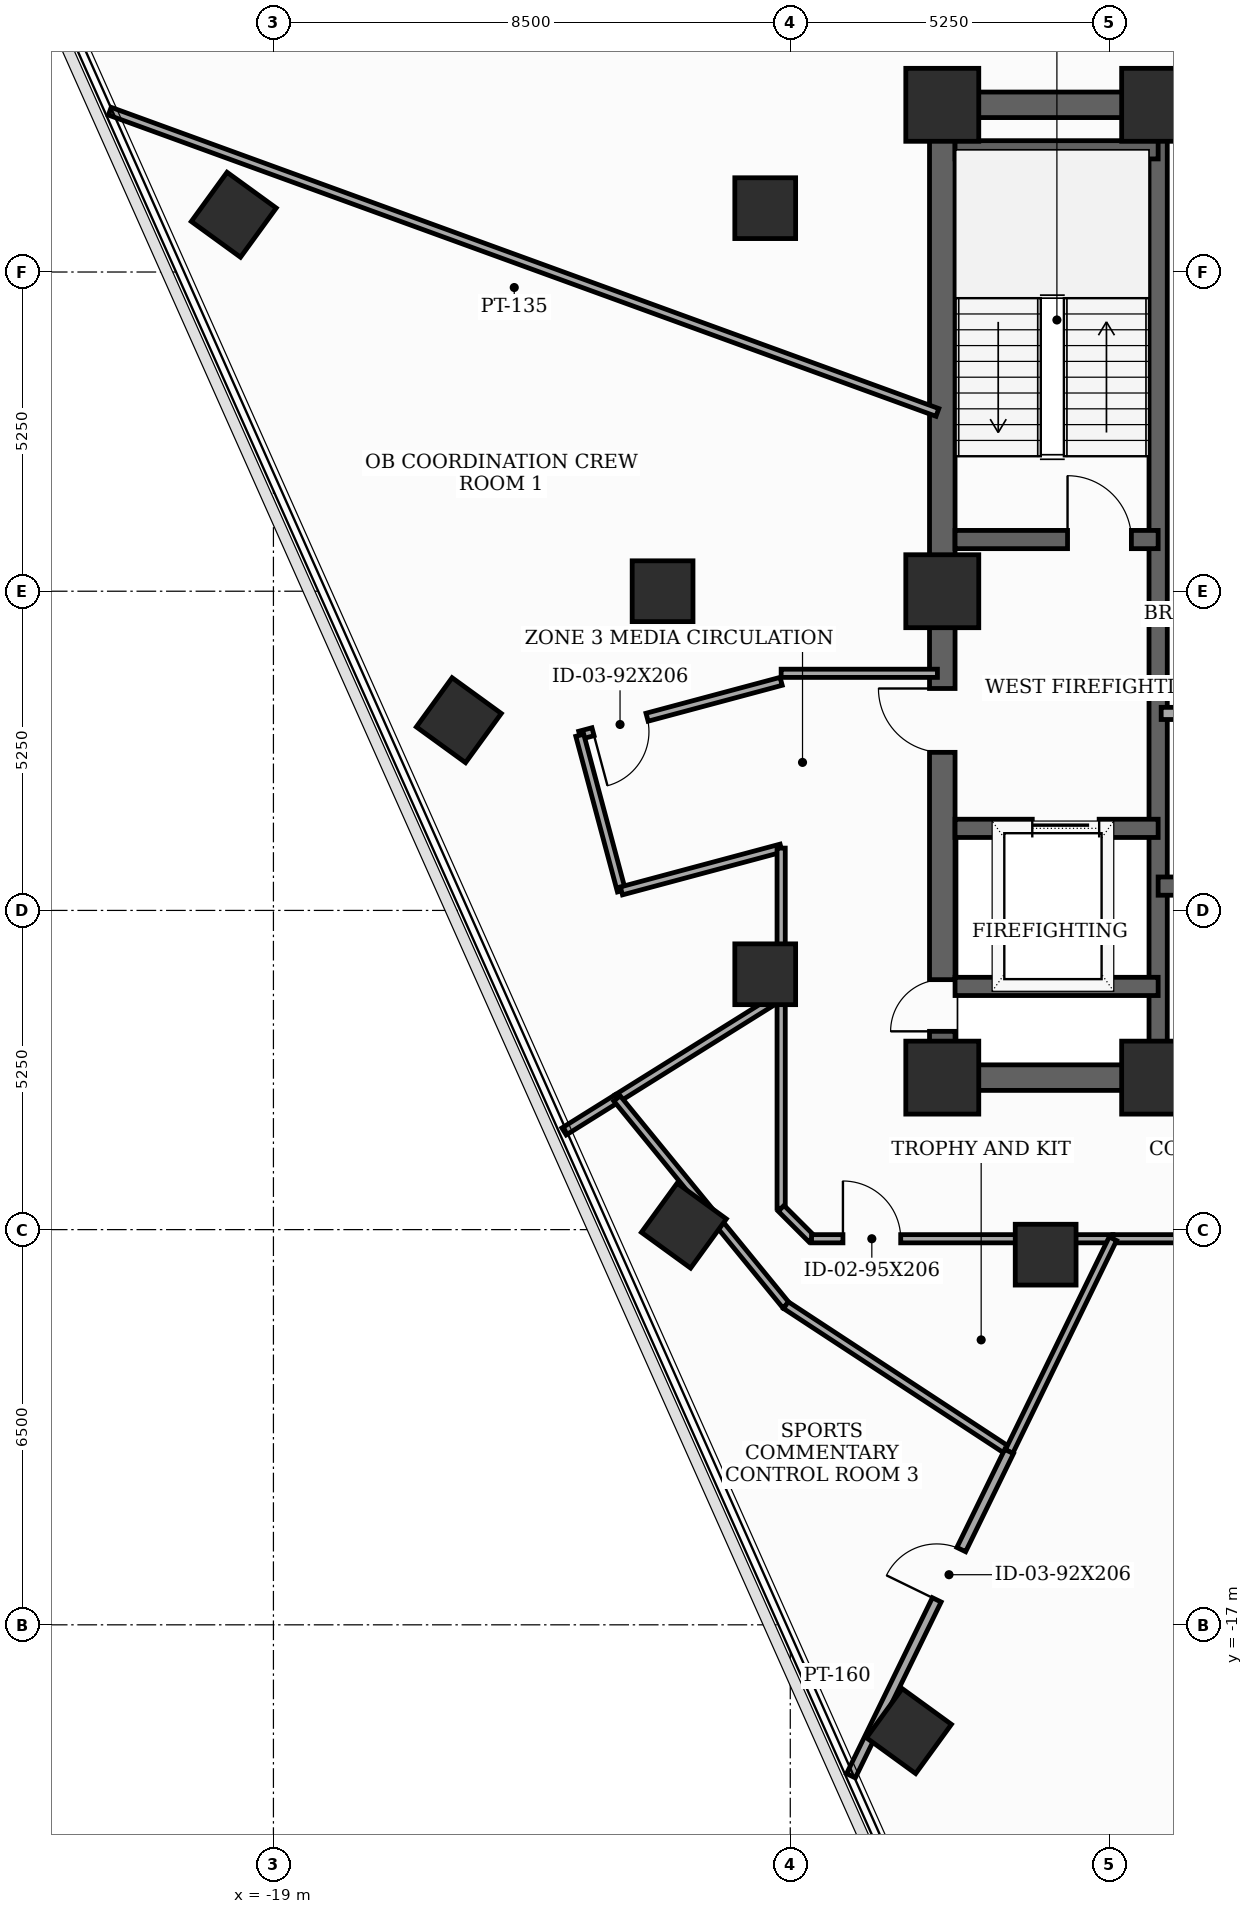
"""IFC4 building model, lengths in metres.
Left out: names, types, materials, properties, quantities, classifications, styles, units other than length and angle.
Written with IfcOpenShell. Run it as: python <this file> out.ifc"""

import sys

from ifc_helpers import new_model, si_unit, direction, frame, frame_2d, origin, origin_2d, place, context, subcontext, project, spatial, rectangle, extrude, element, fill, save


model = new_model("IFC4")
c1 = context("Model", 3, precision=1e-05, world=origin(), true_north=direction((0.0, 1.0)))
c2 = subcontext(c1, "Body", "Model", "MODEL_VIEW")
j1 = project(units=[si_unit("LENGTHUNIT", "METRE"), si_unit("PLANEANGLEUNIT", "RADIAN")], contexts=[c1])
p1 = place(None, origin())
s1 = spatial("IfcSite", under=j1, at=p1, CompositionType="ELEMENT")
p2 = place(p1, origin())
s2 = spatial("IfcBuilding", under=s1, at=p2, CompositionType="ELEMENT")
p3 = place(p2, frame((0.0, 0.0, 244.8)))
s3 = spatial("IfcBuildingStorey", under=s2, at=p3, CompositionType="ELEMENT", Elevation=244.8)
for number, where, z_axis, x_axis in (
    (1, (-8.0, -8.0, 0.0), (0.0, 0.0, 1.0), (1.0, 0.0, 0.0)),
    (2, (-4.45, -8.0, 0.0), (0.0, 0.0, 1.0), (1.0, 0.0, 0.0)),
    (3, (-4.45, 8.0, 0.0), (0.0, 0.0, 1.0), (1.0, 0.0, 0.0)),
    (4, (-8.0, 8.0, 0.0), (0.0, 0.0, 1.0), (1.0, 0.0, 0.0)),
    (5, (-8.0, 0.0, 0.0), (0.0, 0.0, 1.0), (1.0, 0.0, 0.0)),
):
    element("IfcColumn", number, at=place(p3, frame(where, z_axis=z_axis, x_axis=x_axis)), inside=s3, PredefinedType="COLUMN", context=c2, shape_type="SweptSolid", body=[
        extrude(rectangle(XDim=1.2, YDim=1.2, at=origin_2d()), origin(), (0.0, 0.0, 1.0), 3.7),
    ])
for number, where, z_axis, x_axis in (
    (6, (-10.912, 6.3, 0.0), (0.0, 0.0, 1.0), (1.0, 0.0, 0.0)),
    (7, (-12.6, 0.0, 0.0), (0.0, 0.0, 1.0), (1.0, 0.0, 0.0)),
    (8, (-10.912, -6.3, 0.0), (0.0, 0.0, 1.0), (1.0, 0.0, 0.0)),
    (9, (-6.3, -10.912, 0.0), (0.0, 0.0, 1.0), (1.0, 0.0, 0.0)),
    (10, (-19.652, 6.192, 0.0), (0.0, 0.0, 1.0), (0.588, 0.809, 0.0)),
    (11, (-15.951, -2.121, 0.0), (0.0, 0.0, 1.0), (0.588, 0.809, 0.0)),
    (12, (-12.25, -10.435, 0.0), (0.0, 0.0, 1.0), (0.588, 0.809, 0.0)),
    (13, (-8.548, -18.748, 0.0), (0.0, 0.0, 1.0), (0.588, 0.809, 0.0)),
):
    element("IfcColumn", number, at=place(p3, frame(where, z_axis=z_axis, x_axis=x_axis)), inside=s3, PredefinedType="COLUMN", context=c2, shape_type="SweptSolid", body=[
        extrude(rectangle(XDim=1.0, YDim=1.0, at=origin_2d()), origin(), (0.0, 0.0, 1.0), 3.7),
    ])
p4 = place(p3, frame((-8.0, -8.0, 0.0), z_axis=(0.0, 0.0, 1.0), x_axis=(0.0, 1.0, 0.0)))
e14 = element("IfcWall", 14, at=p4, inside=s3, PredefinedType="SHEAR", context=c2, shape_type="SweptSolid", body=[
    extrude(rectangle(XDim=16.0, YDim=0.42, at=frame_2d((8.0, 0.0))), origin(), (0.0, 0.0, 1.0), 3.5),
])
p5 = place(p4, frame((0.761, 0.0, 0.0)))
e15 = element("IfcOpeningElement", 15, at=p5, cuts=e14, PredefinedType="OPENING", context=c2, shape_type="SweptSolid", body=[
    extrude(rectangle(XDim=0.85, YDim=2.02, at=frame_2d((0.425, 1.01))), frame((0.0, 0.22, 0.0), z_axis=(0.0, -1.0, 0.0), x_axis=(1.0, 0.0, 0.0)), (0.0, 0.0, 1.0), 0.44),
])
p6 = place(p4, frame((5.35, 0.0, 0.0)))
e16 = element("IfcOpeningElement", 16, at=p6, cuts=e14, PredefinedType="OPENING", context=c2, shape_type="SweptSolid", body=[
    extrude(rectangle(XDim=1.05, YDim=2.15, at=frame_2d((0.525, 1.075))), frame((0.0, 0.22, 0.0), z_axis=(0.0, -1.0, 0.0), x_axis=(1.0, 0.0, 0.0)), (0.0, 0.0, 1.0), 0.44),
])
p7 = place(p3, frame((-8.0, -8.0, 0.0), z_axis=(0.0, 0.0, 1.0), x_axis=(1.0, 0.0, 0.0)))
e17 = element("IfcWall", 17, at=p7, inside=s3, PredefinedType="SHEAR", context=c2, shape_type="SweptSolid", body=[
    extrude(rectangle(XDim=16.0, YDim=0.42, at=frame_2d((8.0, 0.0))), origin(), (0.0, 0.0, 1.0), 3.5),
])
p8 = place(p7, frame((4.35, 0.0, 0.0)))
e18 = element("IfcOpeningElement", 18, at=p8, cuts=e17, PredefinedType="OPENING", context=c2, shape_type="SweptSolid", body=[
    extrude(rectangle(XDim=0.85, YDim=2.02, at=frame_2d((0.425, 1.01))), frame((0.0, 0.22, 0.0), z_axis=(0.0, -1.0, 0.0), x_axis=(1.0, 0.0, 0.0)), (0.0, 0.0, 1.0), 0.44),
])
p9 = place(p7, frame((6.49, 0.0, 0.0)))
e19 = element("IfcOpeningElement", 19, at=p9, cuts=e17, PredefinedType="OPENING", context=c2, shape_type="SweptSolid", body=[
    extrude(rectangle(XDim=0.85, YDim=2.02, at=frame_2d((0.425, 1.01))), frame((0.0, 0.22, 0.0), z_axis=(0.0, -1.0, 0.0), x_axis=(1.0, 0.0, 0.0)), (0.0, 0.0, 1.0), 0.44),
])
p10 = place(p7, frame((8.69, 0.0, 0.0)))
e20 = element("IfcOpeningElement", 20, at=p10, cuts=e17, PredefinedType="OPENING", context=c2, shape_type="SweptSolid", body=[
    extrude(rectangle(XDim=0.85, YDim=2.02, at=frame_2d((0.425, 1.01))), frame((0.0, 0.22, 0.0), z_axis=(0.0, -1.0, 0.0), x_axis=(1.0, 0.0, 0.0)), (0.0, 0.0, 1.0), 0.44),
])
p11 = place(p7, frame((10.8, 0.0, 0.0)))
e21 = element("IfcOpeningElement", 21, at=p11, cuts=e17, PredefinedType="OPENING", context=c2, shape_type="SweptSolid", body=[
    extrude(rectangle(XDim=0.85, YDim=2.02, at=frame_2d((0.425, 1.01))), frame((0.0, 0.22, 0.0), z_axis=(0.0, -1.0, 0.0), x_axis=(1.0, 0.0, 0.0)), (0.0, 0.0, 1.0), 0.44),
])
p12 = place(p3, frame((-8.0, 8.0, 0.0), z_axis=(0.0, 0.0, 1.0), x_axis=(1.0, 0.0, 0.0)))
e22 = element("IfcWall", 22, at=p12, inside=s3, PredefinedType="SHEAR", context=c2, shape_type="SweptSolid", body=[
    extrude(rectangle(XDim=16.0, YDim=0.42, at=frame_2d((8.0, 0.0))), origin(), (0.0, 0.0, 1.0), 3.5),
])
p13 = place(p12, frame((7.1, 0.0, 0.0)))
e23 = element("IfcOpeningElement", 23, at=p13, cuts=e22, PredefinedType="OPENING", context=c2, shape_type="SweptSolid", body=[
    extrude(rectangle(XDim=1.8, YDim=2.15, at=frame_2d((0.9, 1.075))), frame((0.0, 0.22, 0.0), z_axis=(0.0, -1.0, 0.0), x_axis=(1.0, 0.0, 0.0)), (0.0, 0.0, 1.0), 0.44),
])
p14 = place(p3, frame((-4.45, -7.79, 0.0), z_axis=(0.0, 0.0, 1.0), x_axis=(0.0, 1.0, 0.0)))
e24 = element("IfcWall", 24, at=p14, inside=s3, PredefinedType="SHEAR", context=c2, shape_type="SweptSolid", body=[
    extrude(rectangle(XDim=15.58, YDim=0.3, at=frame_2d((7.79, 0.0))), origin(), (0.0, 0.0, 1.0), 3.5),
])
p15 = place(p3, frame((-7.79, 0.85, 0.0), z_axis=(0.0, 0.0, 1.0), x_axis=(1.0, 0.0, 0.0)))
e25 = element("IfcWall", 25, at=p15, inside=s3, PredefinedType="SHEAR", context=c2, shape_type="SweptSolid", body=[
    extrude(rectangle(XDim=3.34, YDim=0.3, at=frame_2d((1.67, 0.0))), origin(), (0.0, 0.0, 1.0), 3.5),
])
p16 = place(p15, frame((1.85, 0.0, 0.0)))
e26 = element("IfcOpeningElement", 26, at=p16, cuts=e25, PredefinedType="OPENING", context=c2, shape_type="SweptSolid", body=[
    extrude(rectangle(XDim=1.05, YDim=2.15, at=frame_2d((0.525, 1.075))), frame((0.0, 0.16, 0.0), z_axis=(0.0, -1.0, 0.0), x_axis=(1.0, 0.0, 0.0)), (0.0, 0.0, 1.0), 0.32),
])
p17 = place(p3, frame((-7.79, 7.26, 0.0), z_axis=(0.0, 0.0, 1.0), x_axis=(1.0, 0.0, 0.0)))
e27 = element("IfcWall", 27, at=p17, inside=s3, PredefinedType="SHEAR", context=c2, shape_type="SweptSolid", body=[
    extrude(rectangle(XDim=3.34, YDim=0.3, at=frame_2d((1.67, 0.0))), origin(), (0.0, 0.0, 1.0), 3.5),
])
p18 = place(p3, frame((-7.79, -3.9, 0.0), z_axis=(0.0, 0.0, 1.0), x_axis=(1.0, 0.0, 0.0)))
e28 = element("IfcWall", 28, at=p18, inside=s3, PredefinedType="SHEAR", context=c2, shape_type="SweptSolid", body=[
    extrude(rectangle(XDim=3.34, YDim=0.3, at=frame_2d((1.67, 0.0))), origin(), (0.0, 0.0, 1.0), 3.5),
])
p19 = place(p18, frame((1.27, 0.0, 0.0)))
e29 = element("IfcOpeningElement", 29, at=p19, cuts=e28, PredefinedType="OPENING", context=c2, shape_type="SweptSolid", body=[
    extrude(rectangle(XDim=1.1, YDim=2.1, at=frame_2d((0.55, 1.05))), frame((0.0, 0.16, 0.0), z_axis=(0.0, -1.0, 0.0), x_axis=(1.0, 0.0, 0.0)), (0.0, 0.0, 1.0), 0.32),
])
p20 = place(p3, frame((-7.79, -6.5, 0.0), z_axis=(0.0, 0.0, 1.0), x_axis=(1.0, 0.0, 0.0)))
e30 = element("IfcWall", 30, at=p20, inside=s3, PredefinedType="SHEAR", context=c2, shape_type="SweptSolid", body=[
    extrude(rectangle(XDim=3.34, YDim=0.3, at=frame_2d((1.67, 0.0))), origin(), (0.0, 0.0, 1.0), 3.5),
])
p21 = place(p3, frame((-4.45, -4.85, 0.0), z_axis=(0.0, 0.0, 1.0), x_axis=(1.0, 0.0, 0.0)))
e31 = element("IfcWall", 31, at=p21, inside=s3, PredefinedType="SHEAR", context=c2, shape_type="SweptSolid", body=[
    extrude(rectangle(XDim=8.9, YDim=0.3, at=frame_2d((4.45, 0.0))), origin(), (0.0, 0.0, 1.0), 3.5),
])
p22 = place(p3, frame((-4.4, -2.01, 0.0), z_axis=(0.0, 0.0, 1.0), x_axis=(1.0, 0.0, 0.0)))
e32 = element("IfcWall", 32, at=p22, inside=s3, PredefinedType="SOLIDWALL", context=c2, shape_type="SweptSolid", body=[
    extrude(rectangle(XDim=2.68, YDim=0.2, at=frame_2d((1.34, 0.0))), origin(), (0.0, 0.0, 1.0), 3.5),
])
p23 = place(p3, frame((-8.08, -1.35, 0.0), z_axis=(0.0, 0.0, 1.0), x_axis=(-1.0, 0.0, 0.0)))
e33 = element("IfcWall", 33, at=p23, inside=s3, PredefinedType="PARTITIONING", context=c2, shape_type="SweptSolid", body=[
    extrude(rectangle(XDim=2.57, YDim=0.135, at=frame_2d((1.285, 0.0))), origin(), (0.0, 0.0, 1.0), 2.885),
])
p24 = place(p3, frame((-10.65, -1.482, 0.0), z_axis=(0.0, 0.0, 1.0), x_axis=(-0.965961397105, -0.2586862565, 0.0)))
e34 = element("IfcWall", 34, at=p24, inside=s3, PredefinedType="PARTITIONING", context=c2, shape_type="SweptSolid", body=[
    extrude(rectangle(XDim=3.429, YDim=0.135, at=frame_2d((1.714, 0.0))), origin(), (0.0, 0.0, 1.0), 2.085),
])
p25 = place(p24, frame((2.283, 0.0, 0.0)))
e35 = element("IfcOpeningElement", 35, at=p25, cuts=e34, PredefinedType="OPENING", context=c2, shape_type="SweptSolid", body=[
    extrude(rectangle(XDim=0.92, YDim=2.035, at=frame_2d((0.46, 1.018))), frame((0.0, 0.077, 0.0), z_axis=(0.0, -1.0, 0.0), x_axis=(1.0, 0.0, 0.0)), (0.0, 0.0, 1.0), 0.155),
])
p26 = place(p3, frame((-13.962, -2.369, 0.0), z_axis=(0.0, 0.0, 1.0), x_axis=(0.258413725385, -0.966034340245, 0.0)))
e36 = element("IfcWall", 36, at=p26, inside=s3, PredefinedType="PARTITIONING", context=c2, shape_type="SweptSolid", body=[
    extrude(rectangle(XDim=2.65, YDim=0.135, at=frame_2d((1.325, 0.0))), origin(), (0.0, 0.0, 1.0), 2.085),
])
p27 = place(p3, frame((-13.277, -4.929, 0.0), z_axis=(0.0, 0.0, 1.0), x_axis=(0.965934830229, 0.258785439601, 0.0)))
e37 = element("IfcWall", 37, at=p27, inside=s3, PredefinedType="PARTITIONING", context=c2, shape_type="SweptSolid", body=[
    extrude(rectangle(XDim=2.72, YDim=0.135, at=frame_2d((1.36, 0.0))), origin(), (0.0, 0.0, 1.0), 2.085),
])
p28 = place(p3, frame((-10.65, -4.225, 0.0), z_axis=(0.0, 0.0, 1.0), x_axis=(0.0, -1.0, 0.0)))
e38 = element("IfcWall", 38, at=p28, inside=s3, PredefinedType="PARTITIONING", context=c2, shape_type="SweptSolid", body=[
    extrude(rectangle(XDim=2.43, YDim=0.135, at=frame_2d((1.215, 0.0))), origin(), (0.0, 0.0, 1.0), 2.085),
])
p29 = place(p3, frame((-10.65, -6.655, 0.0), z_axis=(0.0, 0.0, 1.0), x_axis=(0.0, -1.0, 0.0)))
e39 = element("IfcWall", 39, at=p29, inside=s3, PredefinedType="PARTITIONING", context=c2, shape_type="SweptSolid", body=[
    extrude(rectangle(XDim=3.495, YDim=0.135, at=frame_2d((1.748, 0.0))), origin(), (0.0, 0.0, 1.0), 2.085),
])
p30 = place(p3, frame((-10.65, -10.15, 0.0), z_axis=(0.0, 0.0, 1.0), x_axis=(0.707106781187, -0.707106781187, 0.0)))
e40 = element("IfcWall", 40, at=p30, inside=s3, PredefinedType="PARTITIONING", context=c2, shape_type="SweptSolid", body=[
    extrude(rectangle(XDim=0.707, YDim=0.135, at=frame_2d((0.354, 0.0))), origin(), (0.0, 0.0, 1.0), 2.085),
])
p31 = place(p3, frame((-10.15, -10.65, 0.0), z_axis=(0.0, 0.0, 1.0), x_axis=(1.0, 0.0, 0.0)))
e41 = element("IfcWall", 41, at=p31, inside=s3, PredefinedType="PARTITIONING", context=c2, shape_type="SweptSolid", body=[
    extrude(rectangle(XDim=4.956, YDim=0.135, at=frame_2d((2.478, 0.0))), origin(), (0.0, 0.0, 1.0), 2.085),
])
p32 = place(p31, frame((0.516, 0.0, 0.0)))
e42 = element("IfcOpeningElement", 42, at=p32, cuts=e41, PredefinedType="OPENING", context=c2, shape_type="SweptSolid", body=[
    extrude(rectangle(XDim=0.95, YDim=2.035, at=frame_2d((0.475, 1.018))), frame((0.0, 0.077, 0.0), z_axis=(0.0, -1.0, 0.0), x_axis=(1.0, 0.0, 0.0)), (0.0, 0.0, 1.0), 0.155),
])
p33 = place(p3, frame((-5.194, -10.65, 0.0), z_axis=(0.0, 0.0, 1.0), x_axis=(1.0, 0.0, 0.0)))
e43 = element("IfcWall", 43, at=p33, inside=s3, PredefinedType="PARTITIONING", context=c2, shape_type="SweptSolid", body=[
    extrude(rectangle(XDim=13.515, YDim=0.135, at=frame_2d((6.758, 0.0))), origin(), (0.0, 0.0, 1.0), 2.085),
])
p34 = place(p33, frame((6.282, 0.0, 0.0)))
e44 = element("IfcOpeningElement", 44, at=p34, cuts=e43, PredefinedType="OPENING", context=c2, shape_type="SweptSolid", body=[
    extrude(rectangle(XDim=0.95, YDim=2.035, at=frame_2d((0.475, 1.018))), frame((0.0, 0.077, 0.0), z_axis=(0.0, -1.0, 0.0), x_axis=(1.0, 0.0, 0.0)), (0.0, 0.0, 1.0), 0.155),
])
p35 = place(p3, frame((-13.35, -8.342, 0.0), z_axis=(0.0, 0.0, 1.0), x_axis=(0.848084450475, 0.529861080721, 0.0)))
e45 = element("IfcWall", 45, at=p35, inside=s3, PredefinedType="PARTITIONING", context=c2, shape_type="SweptSolid", body=[
    extrude(rectangle(XDim=3.184, YDim=0.135, at=frame_2d((1.592, 0.0))), origin(), (0.0, 0.0, 1.0), 2.085),
])
p36 = place(p3, frame((-14.22, -8.885, 0.0), z_axis=(0.0, 0.0, 1.0), x_axis=(0.848265622385, 0.529570990406, 0.0)))
e46 = element("IfcWall", 46, at=p36, inside=s3, PredefinedType="PARTITIONING", context=c2, shape_type="SweptSolid", body=[
    extrude(rectangle(XDim=1.026, YDim=0.135, at=frame_2d((0.513, 0.0))), origin(), (0.0, 0.0, 1.0), 2.085),
])
p37 = place(p3, frame((-8.08, 2.941, 0.0), z_axis=(0.0, 0.0, 1.0), x_axis=(-0.939685602892, 0.342039424216, 0.0)))
e47 = element("IfcWall", 47, at=p37, inside=s3, PredefinedType="PARTITIONING", context=c2, shape_type="SweptSolid", body=[
    extrude(rectangle(XDim=14.485, YDim=0.135, at=frame_2d((7.242, 0.0))), origin(), (0.0, 0.0, 1.0), 2.085),
])
p38 = place(p3, frame((-13.35, -8.342, 0.0), z_axis=(0.0, 0.0, 1.0), x_axis=(0.63273803223, -0.774365922914, 0.0)))
e48 = element("IfcWall", 48, at=p38, inside=s3, PredefinedType="PARTITIONING", context=c2, shape_type="SweptSolid", body=[
    extrude(rectangle(XDim=4.391, YDim=0.135, at=frame_2d((2.195, 0.0))), origin(), (0.0, 0.0, 1.0), 2.085),
])
p39 = place(p3, frame((-10.572, -11.742, 0.0), z_axis=(0.0, 0.0, 1.0), x_axis=(0.836278230032, -0.548305318207, 0.0)))
e49 = element("IfcWall", 49, at=p39, inside=s3, PredefinedType="PARTITIONING", context=c2, shape_type="SweptSolid", body=[
    extrude(rectangle(XDim=4.39, YDim=0.135, at=frame_2d((2.195, 0.0))), origin(), (0.0, 0.0, 1.0), 2.085),
])
p40 = place(p3, frame((-6.901, -14.149, 0.0), z_axis=(0.0, 0.0, 1.0), x_axis=(0.438412512164, 0.89877386988, 0.0)))
e50 = element("IfcWall", 50, at=p40, inside=s3, PredefinedType="PARTITIONING", context=c2, shape_type="SweptSolid", body=[
    extrude(rectangle(XDim=3.893, YDim=0.135, at=frame_2d((1.947, 0.0))), origin(), (0.0, 0.0, 1.0), 2.085),
])
p41 = place(p3, frame((-9.502, -19.482, 0.0), z_axis=(0.0, 0.0, 1.0), x_axis=(0.438370943059, 0.898794145665, 0.0)))
e51 = element("IfcWall", 51, at=p41, inside=s3, PredefinedType="PARTITIONING", context=c2, shape_type="SweptSolid", body=[
    extrude(rectangle(XDim=5.934, YDim=0.16, at=frame_2d((2.967, 0.0))), origin(), (0.0, 0.0, 1.0), 2.085),
])
p42 = place(p41, frame((3.219, 0.0, 0.0)))
e52 = element("IfcOpeningElement", 52, at=p42, cuts=e51, PredefinedType="OPENING", context=c2, shape_type="SweptSolid", body=[
    extrude(rectangle(XDim=0.92, YDim=2.035, at=frame_2d((0.46, 1.018))), frame((0.0, 0.09, 0.0), z_axis=(0.0, -1.0, 0.0), x_axis=(1.0, 0.0, 0.0)), (0.0, 0.0, 1.0), 0.18),
])
p43 = place(p5, origin())
e53 = element("IfcDoor", 53, at=p43, inside=s3, OperationType="SINGLE_SWING_LEFT", PredefinedType="TRAPDOOR", context=c2, shape_type="SweptSolid", body=[
    extrude(rectangle(XDim=0.85, YDim=2.02, at=frame_2d((0.425, 1.01))), frame((0.0, 0.025, 0.0), z_axis=(0.0, -1.0, 0.0), x_axis=(1.0, 0.0, 0.0)), (0.0, 0.0, 1.0), 0.05),
])
fill(e15, e53)
p44 = place(p6, origin())
e54 = element("IfcDoor", 54, at=p44, inside=s3, OperationType="SINGLE_SWING_RIGHT", PredefinedType="DOOR", context=c2, shape_type="SweptSolid", body=[
    extrude(rectangle(XDim=1.05, YDim=2.15, at=frame_2d((0.525, 1.075))), frame((0.0, 0.025, 0.0), z_axis=(0.0, -1.0, 0.0), x_axis=(1.0, 0.0, 0.0)), (0.0, 0.0, 1.0), 0.05),
])
fill(e16, e54)
p45 = place(p16, origin())
e55 = element("IfcDoor", 55, at=p45, inside=s3, OperationType="SINGLE_SWING_LEFT", PredefinedType="DOOR", context=c2, shape_type="SweptSolid", body=[
    extrude(rectangle(XDim=1.05, YDim=2.15, at=frame_2d((0.525, 1.075))), frame((0.0, 0.025, 0.0), z_axis=(0.0, -1.0, 0.0), x_axis=(1.0, 0.0, 0.0)), (0.0, 0.0, 1.0), 0.05),
])
fill(e26, e55)
p46 = place(p19, origin())
e56 = element("IfcDoor", 56, at=p46, inside=s3, OperationType="SLIDING_TO_LEFT", PredefinedType="DOOR", context=c2, shape_type="SweptSolid", body=[
    extrude(rectangle(XDim=1.1, YDim=2.1, at=frame_2d((0.55, 1.05))), frame((0.0, 0.025, 0.0), z_axis=(0.0, -1.0, 0.0), x_axis=(1.0, 0.0, 0.0)), (0.0, 0.0, 1.0), 0.05),
])
fill(e29, e56)
p47 = place(p25, origin())
e57 = element("IfcDoor", 57, at=p47, inside=s3, OperationType="SINGLE_SWING_RIGHT", PredefinedType="DOOR", context=c2, shape_type="SweptSolid", body=[
    extrude(rectangle(XDim=0.92, YDim=2.035, at=frame_2d((0.46, 1.018))), frame((0.0, 0.025, 0.0), z_axis=(0.0, -1.0, 0.0), x_axis=(1.0, 0.0, 0.0)), (0.0, 0.0, 1.0), 0.05),
])
fill(e35, e57)
p48 = place(p32, origin())
e58 = element("IfcDoor", 58, at=p48, inside=s3, OperationType="SINGLE_SWING_LEFT", PredefinedType="DOOR", context=c2, shape_type="SweptSolid", body=[
    extrude(rectangle(XDim=0.95, YDim=2.035, at=frame_2d((0.475, 1.018))), frame((0.0, 0.025, 0.0), z_axis=(0.0, -1.0, 0.0), x_axis=(1.0, 0.0, 0.0)), (0.0, 0.0, 1.0), 0.05),
])
fill(e42, e58)
p49 = place(p42, origin())
e59 = element("IfcDoor", 59, at=p49, inside=s3, OperationType="SINGLE_SWING_LEFT", PredefinedType="DOOR", context=c2, shape_type="SweptSolid", body=[
    extrude(rectangle(XDim=0.92, YDim=2.035, at=frame_2d((0.46, 1.018))), frame((0.0, 0.025, 0.0), z_axis=(0.0, -1.0, 0.0), x_axis=(1.0, 0.0, 0.0)), (0.0, 0.0, 1.0), 0.05),
])
fill(e52, e59)
save(model, sys.argv[1])
